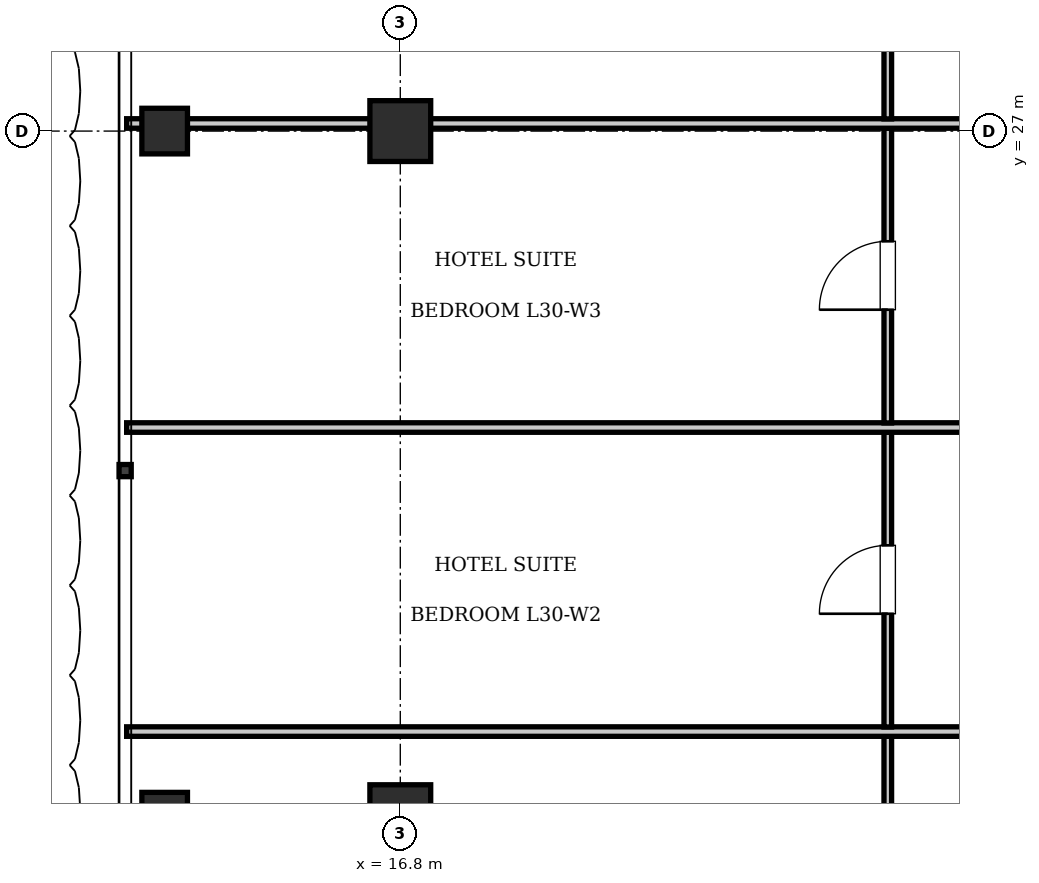
"""IFC4 building model, lengths in metres.
Left out: names, types, materials, properties, quantities, classifications, styles, units other than length and angle.
Written with IfcOpenShell. Run it as: python <this file> out.ifc"""

import sys

from ifc_helpers import new_model, si_unit, direction, frame, frame_2d, origin, origin_2d, place, context, subcontext, project, spatial, rectangle, i_section, extrude, element, fill, save


model = new_model("IFC4")
c1 = context("Model", 3, precision=1e-05, world=origin(), true_north=direction((0.0, 1.0)))
c2 = subcontext(c1, "Body", "Model", "MODEL_VIEW")
j1 = project(units=[si_unit("LENGTHUNIT", "METRE"), si_unit("PLANEANGLEUNIT", "RADIAN")], contexts=[c1])
p1 = place(None, origin())
s1 = spatial("IfcSite", under=j1, at=p1, CompositionType="ELEMENT")
p2 = place(p1, origin())
s2 = spatial("IfcBuilding", under=s1, at=p2, CompositionType="ELEMENT")
p3 = place(p2, frame((0.0, 0.0, 127.4)))
s3 = spatial("IfcBuildingStorey", under=s2, at=p3, CompositionType="ELEMENT", Elevation=127.4)
for number, where, z_axis, x_axis in (
    (1, (16.8, 18.0, 0.0), (0.0, 0.0, 1.0), (1.0, 0.0, 0.0)),
    (2, (16.8, 27.0, 0.0), (0.0, 0.0, 1.0), (1.0, 0.0, 0.0)),
):
    element("IfcColumn", number, at=place(p3, frame(where, z_axis=z_axis, x_axis=x_axis)), inside=s3, PredefinedType="COLUMN", context=c2, shape_type="SweptSolid", body=[
        extrude(rectangle(XDim=0.8, YDim=0.8, at=origin_2d()), origin(), (0.0, 0.0, 1.0), 3.85),
    ])
for number, where, z_axis, x_axis in (
    (3, (13.7, 18.0, 0.0), (0.0, 0.0, 1.0), (1.0, 0.0, 0.0)),
    (4, (13.7, 27.0, 0.0), (0.0, 0.0, 1.0), (1.0, 0.0, 0.0)),
):
    element("IfcColumn", number, at=place(p3, frame(where, z_axis=z_axis, x_axis=x_axis)), inside=s3, PredefinedType="COLUMN", context=c2, shape_type="SweptSolid", body=[
        extrude(i_section(OverallWidth=0.6, OverallDepth=0.6, WebThickness=0.025, FlangeThickness=0.038, at=origin_2d()), origin(), (0.0, 0.0, 1.0), 3.85),
    ])
p4 = place(p3, frame((23.214, 15.16, 0.0), z_axis=(0.0, 0.0, 1.0), x_axis=(0.0, 1.0, 0.0)))
e5 = element("IfcWall", 5, at=p4, inside=s3, PredefinedType="PARTITIONING", context=c2, shape_type="SweptSolid", body=[
    extrude(rectangle(XDim=3.88, YDim=0.1, at=frame_2d((1.94, 0.0))), origin(), (0.0, 0.0, 1.0), 3.61),
])
p5 = place(p4, frame((1.49, 0.0, 0.0)))
e6 = element("IfcOpeningElement", 6, at=p5, cuts=e5, PredefinedType="OPENING", context=c2, shape_type="SweptSolid", body=[
    extrude(rectangle(XDim=0.9, YDim=2.1, at=frame_2d((0.45, 1.05))), frame((0.0, 0.06, 0.0), z_axis=(0.0, -1.0, 0.0), x_axis=(1.0, 0.0, 0.0)), (0.0, 0.0, 1.0), 0.12),
])
p6 = place(p3, frame((13.2, 19.1, 0.0), z_axis=(0.0, 0.0, 1.0), x_axis=(1.0, 0.0, 0.0)))
e7 = element("IfcWall", 7, at=p6, inside=s3, PredefinedType="PARTITIONING", context=c2, shape_type="SweptSolid", body=[
    extrude(rectangle(XDim=23.42, YDim=0.125, at=frame_2d((11.71, 0.0))), origin(), (0.0, 0.0, 1.0), 3.61),
])
p7 = place(p3, frame((23.214, 19.16, 0.0), z_axis=(0.0, 0.0, 1.0), x_axis=(0.0, 1.0, 0.0)))
e8 = element("IfcWall", 8, at=p7, inside=s3, PredefinedType="PARTITIONING", context=c2, shape_type="SweptSolid", body=[
    extrude(rectangle(XDim=3.88, YDim=0.1, at=frame_2d((1.94, 0.0))), origin(), (0.0, 0.0, 1.0), 3.61),
])
p8 = place(p7, frame((1.49, 0.0, 0.0)))
e9 = element("IfcOpeningElement", 9, at=p8, cuts=e8, PredefinedType="OPENING", context=c2, shape_type="SweptSolid", body=[
    extrude(rectangle(XDim=0.9, YDim=2.1, at=frame_2d((0.45, 1.05))), frame((0.0, 0.06, 0.0), z_axis=(0.0, -1.0, 0.0), x_axis=(1.0, 0.0, 0.0)), (0.0, 0.0, 1.0), 0.12),
])
p9 = place(p3, frame((13.2, 23.1, 0.0), z_axis=(0.0, 0.0, 1.0), x_axis=(1.0, 0.0, 0.0)))
e10 = element("IfcWall", 10, at=p9, inside=s3, PredefinedType="PARTITIONING", context=c2, shape_type="SweptSolid", body=[
    extrude(rectangle(XDim=23.42, YDim=0.125, at=frame_2d((11.71, 0.0))), origin(), (0.0, 0.0, 1.0), 3.61),
])
p10 = place(p3, frame((23.214, 23.16, 0.0), z_axis=(0.0, 0.0, 1.0), x_axis=(0.0, 1.0, 0.0)))
e11 = element("IfcWall", 11, at=p10, inside=s3, PredefinedType="PARTITIONING", context=c2, shape_type="SweptSolid", body=[
    extrude(rectangle(XDim=3.88, YDim=0.1, at=frame_2d((1.94, 0.0))), origin(), (0.0, 0.0, 1.0), 3.61),
])
p11 = place(p10, frame((1.49, 0.0, 0.0)))
e12 = element("IfcOpeningElement", 12, at=p11, cuts=e11, PredefinedType="OPENING", context=c2, shape_type="SweptSolid", body=[
    extrude(rectangle(XDim=0.9, YDim=2.1, at=frame_2d((0.45, 1.05))), frame((0.0, 0.06, 0.0), z_axis=(0.0, -1.0, 0.0), x_axis=(1.0, 0.0, 0.0)), (0.0, 0.0, 1.0), 0.12),
])
p12 = place(p3, frame((13.2, 27.1, 0.0), z_axis=(0.0, 0.0, 1.0), x_axis=(1.0, 0.0, 0.0)))
e13 = element("IfcWall", 13, at=p12, inside=s3, PredefinedType="PARTITIONING", context=c2, shape_type="SweptSolid", body=[
    extrude(rectangle(XDim=23.42, YDim=0.125, at=frame_2d((11.71, 0.0))), origin(), (0.0, 0.0, 1.0), 2.41),
])
p13 = place(p3, frame((23.214, 27.16, 0.0), z_axis=(0.0, 0.0, 1.0), x_axis=(0.0, 1.0, 0.0)))
e14 = element("IfcWall", 14, at=p13, inside=s3, PredefinedType="PARTITIONING", context=c2, shape_type="SweptSolid", body=[
    extrude(rectangle(XDim=3.88, YDim=0.1, at=frame_2d((1.94, 0.0))), origin(), (0.0, 0.0, 1.0), 3.61),
])
p14 = place(p13, frame((1.49, 0.0, 0.0)))
e15 = element("IfcOpeningElement", 15, at=p14, cuts=e14, PredefinedType="OPENING", context=c2, shape_type="SweptSolid", body=[
    extrude(rectangle(XDim=0.9, YDim=2.1, at=frame_2d((0.45, 1.05))), frame((0.0, 0.06, 0.0), z_axis=(0.0, -1.0, 0.0), x_axis=(1.0, 0.0, 0.0)), (0.0, 0.0, 1.0), 0.12),
])
p15 = place(p8, origin())
e16 = element("IfcDoor", 16, at=p15, inside=s3, OperationType="SINGLE_SWING_LEFT", PredefinedType="DOOR", context=c2, shape_type="SweptSolid", body=[
    extrude(rectangle(XDim=0.9, YDim=2.1, at=frame_2d((0.45, 1.05))), frame((0.0, 0.025, 0.0), z_axis=(0.0, -1.0, 0.0), x_axis=(1.0, 0.0, 0.0)), (0.0, 0.0, 1.0), 0.05),
])
fill(e9, e16)
p16 = place(p11, origin())
e17 = element("IfcDoor", 17, at=p16, inside=s3, OperationType="SINGLE_SWING_LEFT", PredefinedType="DOOR", context=c2, shape_type="SweptSolid", body=[
    extrude(rectangle(XDim=0.9, YDim=2.1, at=frame_2d((0.45, 1.05))), frame((0.0, 0.025, 0.0), z_axis=(0.0, -1.0, 0.0), x_axis=(1.0, 0.0, 0.0)), (0.0, 0.0, 1.0), 0.05),
])
fill(e12, e17)
save(model, sys.argv[1])
